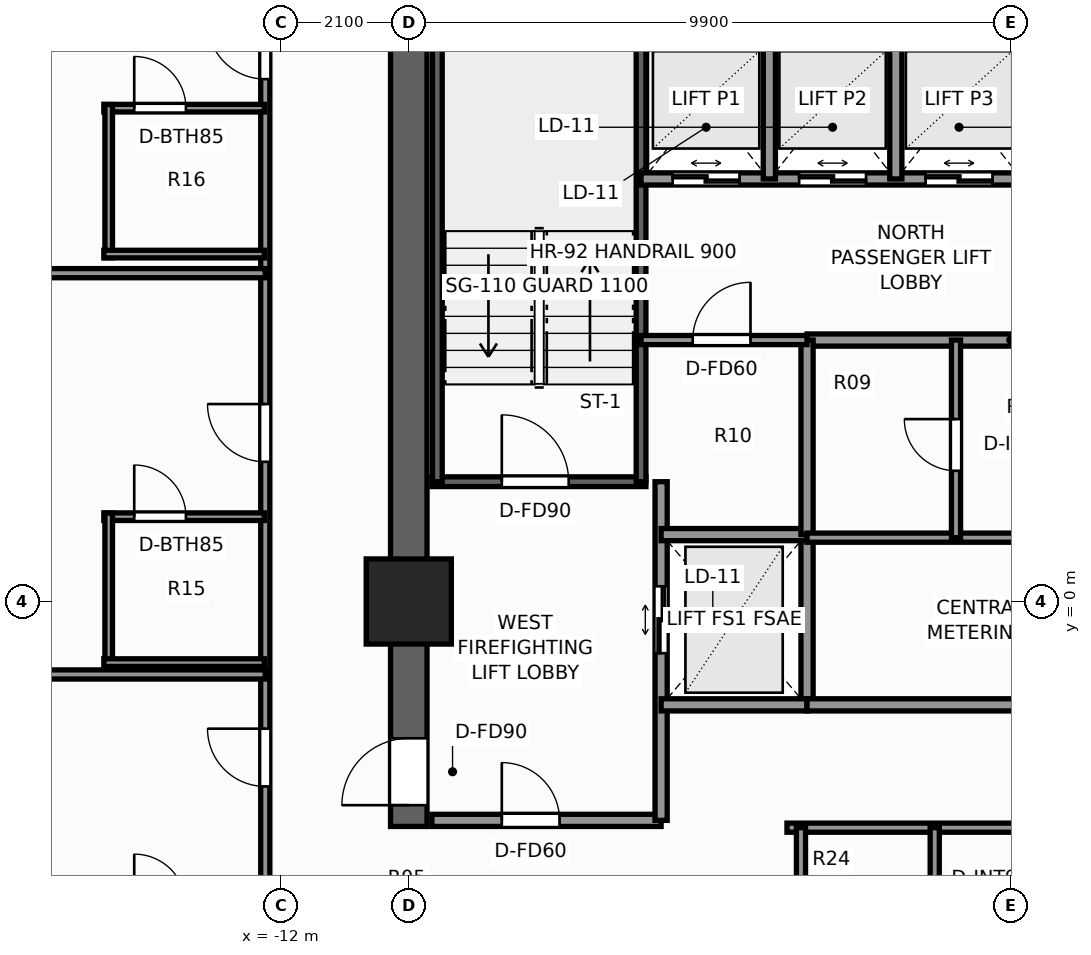
"""IFC4 building model, lengths in metres.
Left out: names, types, materials, properties, quantities, classifications, styles, units other than length and angle.
Written with IfcOpenShell. Run it as: python <this file> out.ifc"""

import sys

from ifc_helpers import new_model, si_unit, direction, frame, frame_2d, origin, origin_2d, place, context, subcontext, project, spatial, rectangle, extrude, element, fill, save


model = new_model("IFC4")
c1 = context("Model", 3, precision=1e-05, world=origin(), true_north=direction((0.0, 1.0)))
c2 = subcontext(c1, "Body", "Model", "MODEL_VIEW")
j1 = project(units=[si_unit("LENGTHUNIT", "METRE"), si_unit("PLANEANGLEUNIT", "RADIAN")], contexts=[c1])
p1 = place(None, origin())
s1 = spatial("IfcSite", under=j1, at=p1, CompositionType="ELEMENT")
p2 = place(p1, origin())
s2 = spatial("IfcBuilding", under=s1, at=p2, CompositionType="ELEMENT")
p3 = place(p2, frame((0.0, 0.0, 50.2)))
s3 = spatial("IfcBuildingStorey", under=s2, at=p3, CompositionType="ELEMENT", Elevation=50.2)
p4 = place(p3, frame((-9.9, -3.7, 0.0), z_axis=(0.0, 0.0, 1.0), x_axis=(0.0, 1.0, 0.0)))
e1 = element("IfcWall", 1, at=p4, inside=s3, PredefinedType="SHEAR", context=c2, shape_type="SweptSolid", body=[
    extrude(rectangle(XDim=13.3, YDim=0.6, at=frame_2d((6.65, 0.0))), origin(), (0.0, 0.0, 1.0), 3.3),
])
p5 = place(p4, frame((0.35, 0.0, 0.0)))
e2 = element("IfcOpeningElement", 2, at=p5, cuts=e1, PredefinedType="OPENING", context=c2, shape_type="SweptSolid", body=[
    extrude(rectangle(XDim=1.1, YDim=2.2, at=frame_2d((0.55, 1.1))), frame((0.0, 0.31, 0.0), z_axis=(0.0, -1.0, 0.0), x_axis=(1.0, 0.0, 0.0)), (0.0, 0.0, 1.0), 0.62),
])
p6 = place(p3, frame((-9.9, 0.0, 0.0), z_axis=(0.0, 0.0, 1.0), x_axis=(1.0, 0.0, 0.0)))
e3 = element("IfcColumn", 3, at=p6, inside=s3, PredefinedType="COLUMN", context=c2, shape_type="SweptSolid", body=[
    extrude(rectangle(XDim=1.4, YDim=1.4, at=origin_2d()), origin(), (0.0, 0.0, 1.0), 3.3),
])
p7 = place(p3, frame((-9.52, 1.97, 0.0), z_axis=(0.0, 0.0, 1.0), x_axis=(1.0, 0.0, 0.0)))
e4 = element("IfcWall", 4, at=p7, inside=s3, PredefinedType="SHEAR", context=c2, shape_type="SweptSolid", body=[
    extrude(rectangle(XDim=3.52, YDim=0.16, at=frame_2d((1.76, 0.0))), origin(), (0.0, 0.0, 1.0), 3.3),
])
p8 = place(p7, frame((1.15, 0.0, 0.0)))
e5 = element("IfcOpeningElement", 5, at=p8, cuts=e4, PredefinedType="OPENING", context=c2, shape_type="SweptSolid", body=[
    extrude(rectangle(XDim=1.1, YDim=2.2, at=frame_2d((0.55, 1.1))), frame((0.0, 0.09, 0.0), z_axis=(0.0, -1.0, 0.0), x_axis=(1.0, 0.0, 0.0)), (0.0, 0.0, 1.0), 0.18),
])
for number, where, z_axis, x_axis in (
    (6, (-9.43, 1.97, 0.0), (0.0, 0.0, 1.0), (0.0, 1.0, 0.0)),
    (7, (-6.08, 1.97, 0.0), (0.0, 0.0, 1.0), (0.0, 1.0, 0.0)),
):
    element("IfcWall", number, at=place(p3, frame(where, z_axis=z_axis, x_axis=x_axis)), inside=s3, PredefinedType="SHEAR", context=c2, shape_type="SweptSolid", body=[
        extrude(rectangle(XDim=7.56, YDim=0.16, at=frame_2d((3.78, 0.0))), origin(), (0.0, 0.0, 1.0), 3.3),
    ])
p9 = place(p3, frame((-9.52, -3.6, 0.0), z_axis=(0.0, 0.0, 1.0), x_axis=(1.0, 0.0, 0.0)))
e8 = element("IfcWall", 8, at=p9, inside=s3, PredefinedType="SOLIDWALL", context=c2, shape_type="SweptSolid", body=[
    extrude(rectangle(XDim=3.77, YDim=0.2, at=frame_2d((1.885, 0.0))), origin(), (0.0, 0.0, 1.0), 3.06),
])
p10 = place(p9, frame((1.15, 0.0, 0.0)))
e9 = element("IfcOpeningElement", 9, at=p10, cuts=e8, PredefinedType="OPENING", context=c2, shape_type="SweptSolid", body=[
    extrude(rectangle(XDim=0.95, YDim=2.06, at=frame_2d((0.475, 1.03))), frame((0.0, 0.11, 0.0), z_axis=(0.0, -1.0, 0.0), x_axis=(1.0, 0.0, 0.0)), (0.0, 0.0, 1.0), 0.22),
])
p11 = place(p3, frame((-5.75, -3.6, 0.0), z_axis=(0.0, 0.0, 1.0), x_axis=(0.0, 1.0, 0.0)))
e10 = element("IfcWall", 10, at=p11, inside=s3, PredefinedType="SOLIDWALL", context=c2, shape_type="SweptSolid", body=[
    extrude(rectangle(XDim=5.57, YDim=0.2, at=frame_2d((2.785, 0.0))), origin(), (0.0, 0.0, 1.0), 3.06),
])
p12 = place(p11, frame((2.75, 0.0, 0.0)))
e11 = element("IfcOpeningElement", 11, at=p12, cuts=e10, PredefinedType="OPENING", context=c2, shape_type="SweptSolid", body=[
    extrude(rectangle(XDim=1.1, YDim=2.2, at=frame_2d((0.55, 1.1))), frame((0.0, 0.11, 0.0), z_axis=(0.0, -1.0, 0.0), x_axis=(1.0, 0.0, 0.0)), (0.0, 0.0, 1.0), 0.22),
])
p13 = place(p3, frame((-3.35, -1.7, 0.0), z_axis=(0.0, 0.0, 1.0), x_axis=(0.0, 1.0, 0.0)))
e12 = element("IfcWall", 12, at=p13, inside=s3, PredefinedType="SOLIDWALL", context=c2, shape_type="SweptSolid", body=[
    extrude(rectangle(XDim=2.8, YDim=0.2, at=frame_2d((1.4, 0.0))), origin(), (0.0, 0.0, 1.0), 3.06),
])
for number, where, z_axis, x_axis in (
    (13, (-5.75, -1.7, 0.0), (0.0, 0.0, 1.0), (1.0, 0.0, 0.0)),
    (14, (-5.75, 1.1, 0.0), (0.0, 0.0, 1.0), (1.0, 0.0, 0.0)),
):
    element("IfcWall", number, at=place(p3, frame(where, z_axis=z_axis, x_axis=x_axis)), inside=s3, PredefinedType="SOLIDWALL", context=c2, shape_type="SweptSolid", body=[
        extrude(rectangle(XDim=2.4, YDim=0.2, at=frame_2d((1.2, 0.0))), origin(), (0.0, 0.0, 1.0), 3.06),
    ])
p14 = place(p3, frame((-6.08, 6.95, 0.0), z_axis=(0.0, 0.0, 1.0), x_axis=(1.0, 0.0, 0.0)))
e15 = element("IfcWall", 15, at=p14, inside=s3, PredefinedType="SOLIDWALL", context=c2, shape_type="SweptSolid", body=[
    extrude(rectangle(XDim=6.3, YDim=0.2, at=frame_2d((3.15, 0.0))), origin(), (0.0, 0.0, 1.0), 3.06),
])
p15 = place(p14, frame((0.52, 0.0, 0.0)))
e16 = element("IfcOpeningElement", 16, at=p15, cuts=e15, PredefinedType="OPENING", context=c2, shape_type="SweptSolid", body=[
    extrude(rectangle(XDim=1.1, YDim=2.2, at=frame_2d((0.55, 1.1))), frame((0.0, 0.11, 0.0), z_axis=(0.0, -1.0, 0.0), x_axis=(1.0, 0.0, 0.0)), (0.0, 0.0, 1.0), 0.22),
])
p16 = place(p14, frame((2.6, 0.0, 0.0)))
e17 = element("IfcOpeningElement", 17, at=p16, cuts=e15, PredefinedType="OPENING", context=c2, shape_type="SweptSolid", body=[
    extrude(rectangle(XDim=1.1, YDim=2.2, at=frame_2d((0.55, 1.1))), frame((0.0, 0.11, 0.0), z_axis=(0.0, -1.0, 0.0), x_axis=(1.0, 0.0, 0.0)), (0.0, 0.0, 1.0), 0.22),
])
p17 = place(p14, frame((4.68, 0.0, 0.0)))
e18 = element("IfcOpeningElement", 18, at=p17, cuts=e15, PredefinedType="OPENING", context=c2, shape_type="SweptSolid", body=[
    extrude(rectangle(XDim=1.1, YDim=2.2, at=frame_2d((0.55, 1.1))), frame((0.0, 0.11, 0.0), z_axis=(0.0, -1.0, 0.0), x_axis=(1.0, 0.0, 0.0)), (0.0, 0.0, 1.0), 0.22),
])
for number, where, z_axis, x_axis in (
    (19, (-3.97, 6.95, 0.0), (0.0, 0.0, 1.0), (0.0, 1.0, 0.0)),
    (20, (-1.89, 6.95, 0.0), (0.0, 0.0, 1.0), (0.0, 1.0, 0.0)),
):
    element("IfcWall", number, at=place(p3, frame(where, z_axis=z_axis, x_axis=x_axis)), inside=s3, PredefinedType="SOLIDWALL", context=c2, shape_type="SweptSolid", body=[
        extrude(rectangle(XDim=2.57, YDim=0.2, at=frame_2d((1.285, 0.0))), origin(), (0.0, 0.0, 1.0), 3.06),
    ])
p18 = place(p3, frame((-3.35, 4.3, 0.0), z_axis=(0.0, 0.0, 1.0), x_axis=(1.0, 0.0, 0.0)))
e21 = element("IfcWall", 21, at=p18, inside=s3, PredefinedType="SOLIDWALL", context=c2, shape_type="SweptSolid", body=[
    extrude(rectangle(XDim=6.7, YDim=0.2, at=frame_2d((3.35, 0.0))), origin(), (0.0, 0.0, 1.0), 3.06),
])
p19 = place(p18, frame((4.35, 0.0, 0.0)))
e22 = element("IfcOpeningElement", 22, at=p19, cuts=e21, PredefinedType="OPENING", context=c2, shape_type="SweptSolid", body=[
    extrude(rectangle(XDim=0.95, YDim=2.06, at=frame_2d((0.475, 1.03))), frame((0.0, 0.11, 0.0), z_axis=(0.0, -1.0, 0.0), x_axis=(1.0, 0.0, 0.0)), (0.0, 0.0, 1.0), 0.22),
])
p20 = place(p3, frame((-3.35, -1.7, 0.0), z_axis=(0.0, 0.0, 1.0), x_axis=(1.0, 0.0, 0.0)))
e23 = element("IfcWall", 23, at=p20, inside=s3, PredefinedType="SOLIDWALL", context=c2, shape_type="SweptSolid", body=[
    extrude(rectangle(XDim=6.7, YDim=0.2, at=frame_2d((3.35, 0.0))), origin(), (0.0, 0.0, 1.0), 3.06),
])
p21 = place(p3, frame((-3.35, 1.1, 0.0), z_axis=(0.0, 0.0, 1.0), x_axis=(0.0, 1.0, 0.0)))
e24 = element("IfcWall", 24, at=p21, inside=s3, PredefinedType="SOLIDWALL", context=c2, shape_type="SweptSolid", body=[
    extrude(rectangle(XDim=3.2, YDim=0.2, at=frame_2d((1.6, 0.0))), origin(), (0.0, 0.0, 1.0), 3.06),
])
p22 = place(p3, frame((-3.35, 1.05, 0.0), z_axis=(0.0, 0.0, 1.0), x_axis=(1.0, 0.0, 0.0)))
e25 = element("IfcWall", 25, at=p22, inside=s3, PredefinedType="PARTITIONING", context=c2, shape_type="SweptSolid", body=[
    extrude(rectangle(XDim=6.7, YDim=0.15, at=frame_2d((3.35, 0.0))), origin(), (0.0, 0.0, 1.0), 3.06),
])
p23 = place(p22, frame((4.2, 0.0, 0.0)))
e26 = element("IfcOpeningElement", 26, at=p23, cuts=e25, PredefinedType="OPENING", context=c2, shape_type="SweptSolid", body=[
    extrude(rectangle(XDim=0.85, YDim=2.03, at=frame_2d((0.425, 1.015))), frame((0.0, 0.085, 0.0), z_axis=(0.0, -1.0, 0.0), x_axis=(1.0, 0.0, 0.0)), (0.0, 0.0, 1.0), 0.17),
])
p24 = place(p3, frame((-0.9, 1.05, 0.0), z_axis=(0.0, 0.0, 1.0), x_axis=(0.0, 1.0, 0.0)))
e27 = element("IfcWall", 27, at=p24, inside=s3, PredefinedType="PARTITIONING", context=c2, shape_type="SweptSolid", body=[
    extrude(rectangle(XDim=3.25, YDim=0.15, at=frame_2d((1.625, 0.0))), origin(), (0.0, 0.0, 1.0), 3.06),
])
p25 = place(p24, frame((1.1, 0.0, 0.0)))
e28 = element("IfcOpeningElement", 28, at=p25, cuts=e27, PredefinedType="OPENING", context=c2, shape_type="SweptSolid", body=[
    extrude(rectangle(XDim=0.85, YDim=2.03, at=frame_2d((0.425, 1.015))), frame((0.0, 0.085, 0.0), z_axis=(0.0, -1.0, 0.0), x_axis=(1.0, 0.0, 0.0)), (0.0, 0.0, 1.0), 0.17),
])
p26 = place(p3, frame((-3.68, -3.72, 0.0), z_axis=(0.0, 0.0, 1.0), x_axis=(1.0, 0.0, 0.0)))
e29 = element("IfcWall", 29, at=p26, inside=s3, PredefinedType="PARTITIONING", context=c2, shape_type="SweptSolid", body=[
    extrude(rectangle(XDim=7.36, YDim=0.15, at=frame_2d((3.68, 0.0))), origin(), (0.0, 0.0, 1.0), 3.06),
])
p27 = place(p3, frame((-3.45, -6.08, 0.0), z_axis=(0.0, 0.0, 1.0), x_axis=(0.0, 1.0, 0.0)))
e30 = element("IfcWall", 30, at=p27, inside=s3, PredefinedType="PARTITIONING", context=c2, shape_type="SweptSolid", body=[
    extrude(rectangle(XDim=2.36, YDim=0.15, at=frame_2d((1.18, 0.0))), origin(), (0.0, 0.0, 1.0), 3.06),
])
p28 = place(p3, frame((-1.25, -6.08, 0.0), z_axis=(0.0, 0.0, 1.0), x_axis=(0.0, 1.0, 0.0)))
e31 = element("IfcWall", 31, at=p28, inside=s3, PredefinedType="PARTITIONING", context=c2, shape_type="SweptSolid", body=[
    extrude(rectangle(XDim=2.36, YDim=0.15, at=frame_2d((1.18, 0.0))), origin(), (0.0, 0.0, 1.0), 3.06),
])
p29 = place(p28, frame((0.65, 0.0, 0.0)))
e32 = element("IfcOpeningElement", 32, at=p29, cuts=e31, PredefinedType="OPENING", context=c2, shape_type="SweptSolid", body=[
    extrude(rectangle(XDim=0.9, YDim=2.06, at=frame_2d((0.45, 1.03))), frame((0.0, 0.085, 0.0), z_axis=(0.0, -1.0, 0.0), x_axis=(1.0, 0.0, 0.0)), (0.0, 0.0, 1.0), 0.17),
])
p30 = place(p3, frame((-6.08, 4.3, 0.0), z_axis=(0.0, 0.0, 1.0), x_axis=(1.0, 0.0, 0.0)))
e33 = element("IfcWall", 33, at=p30, inside=s3, PredefinedType="PARTITIONING", context=c2, shape_type="SweptSolid", body=[
    extrude(rectangle(XDim=2.73, YDim=0.15, at=frame_2d((1.365, 0.0))), origin(), (0.0, 0.0, 1.0), 3.06),
])
p31 = place(p30, frame((0.85, 0.0, 0.0)))
e34 = element("IfcOpeningElement", 34, at=p31, cuts=e33, PredefinedType="OPENING", context=c2, shape_type="SweptSolid", body=[
    extrude(rectangle(XDim=0.95, YDim=2.06, at=frame_2d((0.475, 1.03))), frame((0.0, 0.085, 0.0), z_axis=(0.0, -1.0, 0.0), x_axis=(1.0, 0.0, 0.0)), (0.0, 0.0, 1.0), 0.17),
])
p32 = place(p3, frame((-12.26, -12.26, 0.0), z_axis=(0.0, 0.0, 1.0), x_axis=(0.0, 1.0, 0.0)))
e35 = element("IfcWall", 35, at=p32, inside=s3, PredefinedType="PARTITIONING", context=c2, shape_type="SweptSolid", body=[
    extrude(rectangle(XDim=24.84, YDim=0.15, at=frame_2d((12.42, 0.0))), origin(), (0.0, 0.0, 1.0), 2.272),
])
p33 = place(p32, frame((3.448, 0.0, 0.0)))
e36 = element("IfcOpeningElement", 36, at=p33, cuts=e35, PredefinedType="OPENING", context=c2, shape_type="SweptSolid", body=[
    extrude(rectangle(XDim=0.95, YDim=2.06, at=frame_2d((0.475, 1.03))), frame((0.0, 0.085, 0.0), z_axis=(0.0, -1.0, 0.0), x_axis=(1.0, 0.0, 0.0)), (0.0, 0.0, 1.0), 0.17),
])
p34 = place(p32, frame((9.218, 0.0, 0.0)))
e37 = element("IfcOpeningElement", 37, at=p34, cuts=e35, PredefinedType="OPENING", context=c2, shape_type="SweptSolid", body=[
    extrude(rectangle(XDim=0.95, YDim=2.06, at=frame_2d((0.475, 1.03))), frame((0.0, 0.085, 0.0), z_axis=(0.0, -1.0, 0.0), x_axis=(1.0, 0.0, 0.0)), (0.0, 0.0, 1.0), 0.17),
])
p35 = place(p32, frame((14.558, 0.0, 0.0)))
e38 = element("IfcOpeningElement", 38, at=p35, cuts=e35, PredefinedType="OPENING", context=c2, shape_type="SweptSolid", body=[
    extrude(rectangle(XDim=0.95, YDim=2.06, at=frame_2d((0.475, 1.03))), frame((0.0, 0.085, 0.0), z_axis=(0.0, -1.0, 0.0), x_axis=(1.0, 0.0, 0.0)), (0.0, 0.0, 1.0), 0.17),
])
p36 = place(p32, frame((20.852, 0.0, 0.0)))
e39 = element("IfcOpeningElement", 39, at=p36, cuts=e35, PredefinedType="OPENING", context=c2, shape_type="SweptSolid", body=[
    extrude(rectangle(XDim=0.95, YDim=2.06, at=frame_2d((0.475, 1.03))), frame((0.0, 0.085, 0.0), z_axis=(0.0, -1.0, 0.0), x_axis=(1.0, 0.0, 0.0)), (0.0, 0.0, 1.0), 0.17),
])
for number, where, z_axis, x_axis in (
    (40, (-21.98, -1.2, 0.0), (0.0, 0.0, 1.0), (1.0, 0.0, 0.0)),
    (41, (-21.98, 5.4, 0.0), (0.0, 0.0, 1.0), (1.0, 0.0, 0.0)),
):
    element("IfcWall", number, at=place(p3, frame(where, z_axis=z_axis, x_axis=x_axis)), inside=s3, PredefinedType="PARTITIONING", context=c2, shape_type="SweptSolid", body=[
        extrude(rectangle(XDim=9.72, YDim=0.15, at=frame_2d((4.86, 0.0))), origin(), (0.0, 0.0, 1.0), 2.429),
    ])
p37 = place(p3, frame((-14.915, 1.395, 0.0), z_axis=(0.0, 0.0, 1.0), x_axis=(1.0, 0.0, 0.0)))
e42 = element("IfcWall", 42, at=p37, inside=s3, PredefinedType="PARTITIONING", context=c2, shape_type="SweptSolid", body=[
    extrude(rectangle(XDim=2.64, YDim=0.125, at=frame_2d((1.32, 0.0))), origin(), (0.0, 0.0, 1.0), 3.06),
])
p38 = place(p37, frame((0.5, 0.0, 0.0)))
e43 = element("IfcOpeningElement", 43, at=p38, cuts=e42, PredefinedType="OPENING", context=c2, shape_type="SweptSolid", body=[
    extrude(rectangle(XDim=0.85, YDim=2.03, at=frame_2d((0.425, 1.015))), frame((0.0, 0.073, 0.0), z_axis=(0.0, -1.0, 0.0), x_axis=(1.0, 0.0, 0.0)), (0.0, 0.0, 1.0), 0.145),
])
p39 = place(p3, frame((-14.835, -1.065, 0.0), z_axis=(0.0, 0.0, 1.0), x_axis=(0.0, 1.0, 0.0)))
e44 = element("IfcWall", 44, at=p39, inside=s3, PredefinedType="PARTITIONING", context=c2, shape_type="SweptSolid", body=[
    extrude(rectangle(XDim=2.52, YDim=0.125, at=frame_2d((1.26, 0.0))), origin(), (0.0, 0.0, 1.0), 2.585),
])
p40 = place(p3, frame((-14.915, -1.005, 0.0), z_axis=(0.0, 0.0, 1.0), x_axis=(1.0, 0.0, 0.0)))
e45 = element("IfcWall", 45, at=p40, inside=s3, PredefinedType="PARTITIONING", context=c2, shape_type="SweptSolid", body=[
    extrude(rectangle(XDim=2.64, YDim=0.125, at=frame_2d((1.32, 0.0))), origin(), (0.0, 0.0, 1.0), 3.06),
])
p41 = place(p3, frame((-14.915, 8.114, 0.0), z_axis=(0.0, 0.0, 1.0), x_axis=(1.0, 0.0, 0.0)))
e46 = element("IfcWall", 46, at=p41, inside=s3, PredefinedType="PARTITIONING", context=c2, shape_type="SweptSolid", body=[
    extrude(rectangle(XDim=2.64, YDim=0.125, at=frame_2d((1.32, 0.0))), origin(), (0.0, 0.0, 1.0), 3.06),
])
p42 = place(p41, frame((0.5, 0.0, 0.0)))
e47 = element("IfcOpeningElement", 47, at=p42, cuts=e46, PredefinedType="OPENING", context=c2, shape_type="SweptSolid", body=[
    extrude(rectangle(XDim=0.85, YDim=2.03, at=frame_2d((0.425, 1.015))), frame((0.0, 0.073, 0.0), z_axis=(0.0, -1.0, 0.0), x_axis=(1.0, 0.0, 0.0)), (0.0, 0.0, 1.0), 0.145),
])
p43 = place(p3, frame((-14.835, 5.654, 0.0), z_axis=(0.0, 0.0, 1.0), x_axis=(0.0, 1.0, 0.0)))
e48 = element("IfcWall", 48, at=p43, inside=s3, PredefinedType="PARTITIONING", context=c2, shape_type="SweptSolid", body=[
    extrude(rectangle(XDim=2.52, YDim=0.125, at=frame_2d((1.26, 0.0))), origin(), (0.0, 0.0, 1.0), 3.06),
])
p44 = place(p3, frame((-14.915, 5.714, 0.0), z_axis=(0.0, 0.0, 1.0), x_axis=(1.0, 0.0, 0.0)))
e49 = element("IfcWall", 49, at=p44, inside=s3, PredefinedType="PARTITIONING", context=c2, shape_type="SweptSolid", body=[
    extrude(rectangle(XDim=2.64, YDim=0.125, at=frame_2d((1.32, 0.0))), origin(), (0.0, 0.0, 1.0), 3.06),
])
p45 = place(p8, origin())
e50 = element("IfcDoor", 50, at=p45, inside=s3, OperationType="SINGLE_SWING_LEFT", PredefinedType="DOOR", context=c2, shape_type="SweptSolid", body=[
    extrude(rectangle(XDim=1.1, YDim=2.2, at=frame_2d((0.55, 1.1))), frame((0.0, 0.025, 0.0), z_axis=(0.0, -1.0, 0.0), x_axis=(1.0, 0.0, 0.0)), (0.0, 0.0, 1.0), 0.05),
])
fill(e5, e50)
p46 = place(p5, origin())
e51 = element("IfcDoor", 51, at=p46, inside=s3, OperationType="SINGLE_SWING_LEFT", PredefinedType="DOOR", context=c2, shape_type="SweptSolid", body=[
    extrude(rectangle(XDim=1.1, YDim=2.2, at=frame_2d((0.55, 1.1))), frame((0.0, 0.025, 0.0), z_axis=(0.0, -1.0, 0.0), x_axis=(1.0, 0.0, 0.0)), (0.0, 0.0, 1.0), 0.05),
])
fill(e2, e51)
p47 = place(p12, origin())
e52 = element("IfcDoor", 52, at=p47, inside=s3, OperationType="DOUBLE_DOOR_SLIDING", PredefinedType="DOOR", context=c2, shape_type="SweptSolid", body=[
    extrude(rectangle(XDim=1.1, YDim=2.2, at=frame_2d((0.55, 1.1))), frame((0.0, 0.025, 0.0), z_axis=(0.0, -1.0, 0.0), x_axis=(1.0, 0.0, 0.0)), (0.0, 0.0, 1.0), 0.05),
])
fill(e11, e52)
p48 = place(p15, origin())
e53 = element("IfcDoor", 53, at=p48, inside=s3, OperationType="DOUBLE_DOOR_SLIDING", PredefinedType="DOOR", context=c2, shape_type="SweptSolid", body=[
    extrude(rectangle(XDim=1.1, YDim=2.2, at=frame_2d((0.55, 1.1))), frame((0.0, 0.025, 0.0), z_axis=(0.0, -1.0, 0.0), x_axis=(1.0, 0.0, 0.0)), (0.0, 0.0, 1.0), 0.05),
])
fill(e16, e53)
p49 = place(p16, origin())
e54 = element("IfcDoor", 54, at=p49, inside=s3, OperationType="DOUBLE_DOOR_SLIDING", PredefinedType="DOOR", context=c2, shape_type="SweptSolid", body=[
    extrude(rectangle(XDim=1.1, YDim=2.2, at=frame_2d((0.55, 1.1))), frame((0.0, 0.025, 0.0), z_axis=(0.0, -1.0, 0.0), x_axis=(1.0, 0.0, 0.0)), (0.0, 0.0, 1.0), 0.05),
])
fill(e17, e54)
p50 = place(p17, origin())
e55 = element("IfcDoor", 55, at=p50, inside=s3, OperationType="DOUBLE_DOOR_SLIDING", PredefinedType="DOOR", context=c2, shape_type="SweptSolid", body=[
    extrude(rectangle(XDim=1.1, YDim=2.2, at=frame_2d((0.55, 1.1))), frame((0.0, 0.025, 0.0), z_axis=(0.0, -1.0, 0.0), x_axis=(1.0, 0.0, 0.0)), (0.0, 0.0, 1.0), 0.05),
])
fill(e18, e55)
p51 = place(p10, origin())
e56 = element("IfcDoor", 56, at=p51, inside=s3, OperationType="SINGLE_SWING_LEFT", PredefinedType="DOOR", context=c2, shape_type="SweptSolid", body=[
    extrude(rectangle(XDim=0.95, YDim=2.06, at=frame_2d((0.475, 1.03))), frame((0.0, 0.025, 0.0), z_axis=(0.0, -1.0, 0.0), x_axis=(1.0, 0.0, 0.0)), (0.0, 0.0, 1.0), 0.05),
])
fill(e9, e56)
p52 = place(p25, origin())
e57 = element("IfcDoor", 57, at=p52, inside=s3, OperationType="SINGLE_SWING_RIGHT", PredefinedType="DOOR", context=c2, shape_type="SweptSolid", body=[
    extrude(rectangle(XDim=0.85, YDim=2.03, at=frame_2d((0.425, 1.015))), frame((0.0, 0.025, 0.0), z_axis=(0.0, -1.0, 0.0), x_axis=(1.0, 0.0, 0.0)), (0.0, 0.0, 1.0), 0.05),
])
fill(e28, e57)
p53 = place(p31, origin())
e58 = element("IfcDoor", 58, at=p53, inside=s3, OperationType="SINGLE_SWING_RIGHT", PredefinedType="DOOR", context=c2, shape_type="SweptSolid", body=[
    extrude(rectangle(XDim=0.95, YDim=2.06, at=frame_2d((0.475, 1.03))), frame((0.0, 0.025, 0.0), z_axis=(0.0, -1.0, 0.0), x_axis=(1.0, 0.0, 0.0)), (0.0, 0.0, 1.0), 0.05),
])
fill(e34, e58)
p54 = place(p34, origin())
e59 = element("IfcDoor", 59, at=p54, inside=s3, OperationType="SINGLE_SWING_RIGHT", PredefinedType="DOOR", context=c2, shape_type="SweptSolid", body=[
    extrude(rectangle(XDim=0.95, YDim=2.06, at=frame_2d((0.475, 1.03))), frame((0.0, 0.025, 0.0), z_axis=(0.0, -1.0, 0.0), x_axis=(1.0, 0.0, 0.0)), (0.0, 0.0, 1.0), 0.05),
])
fill(e37, e59)
p55 = place(p38, origin())
e60 = element("IfcDoor", 60, at=p55, inside=s3, OperationType="SINGLE_SWING_LEFT", PredefinedType="DOOR", context=c2, shape_type="SweptSolid", body=[
    extrude(rectangle(XDim=0.85, YDim=2.03, at=frame_2d((0.425, 1.015))), frame((0.0, 0.025, 0.0), z_axis=(0.0, -1.0, 0.0), x_axis=(1.0, 0.0, 0.0)), (0.0, 0.0, 1.0), 0.05),
])
fill(e43, e60)
p56 = place(p35, origin())
e61 = element("IfcDoor", 61, at=p56, inside=s3, OperationType="SINGLE_SWING_RIGHT", PredefinedType="DOOR", context=c2, shape_type="SweptSolid", body=[
    extrude(rectangle(XDim=0.95, YDim=2.06, at=frame_2d((0.475, 1.03))), frame((0.0, 0.025, 0.0), z_axis=(0.0, -1.0, 0.0), x_axis=(1.0, 0.0, 0.0)), (0.0, 0.0, 1.0), 0.05),
])
fill(e38, e61)
p57 = place(p42, origin())
e62 = element("IfcDoor", 62, at=p57, inside=s3, OperationType="SINGLE_SWING_LEFT", PredefinedType="DOOR", context=c2, shape_type="SweptSolid", body=[
    extrude(rectangle(XDim=0.85, YDim=2.03, at=frame_2d((0.425, 1.015))), frame((0.0, 0.025, 0.0), z_axis=(0.0, -1.0, 0.0), x_axis=(1.0, 0.0, 0.0)), (0.0, 0.0, 1.0), 0.05),
])
fill(e47, e62)
p58 = place(p36, origin())
e63 = element("IfcDoor", 63, at=p58, inside=s3, OperationType="SINGLE_SWING_RIGHT", PredefinedType="DOOR", context=c2, shape_type="SweptSolid", body=[
    extrude(rectangle(XDim=0.95, YDim=2.06, at=frame_2d((0.475, 1.03))), frame((0.0, 0.025, 0.0), z_axis=(0.0, -1.0, 0.0), x_axis=(1.0, 0.0, 0.0)), (0.0, 0.0, 1.0), 0.05),
])
fill(e39, e63)
save(model, sys.argv[1])
